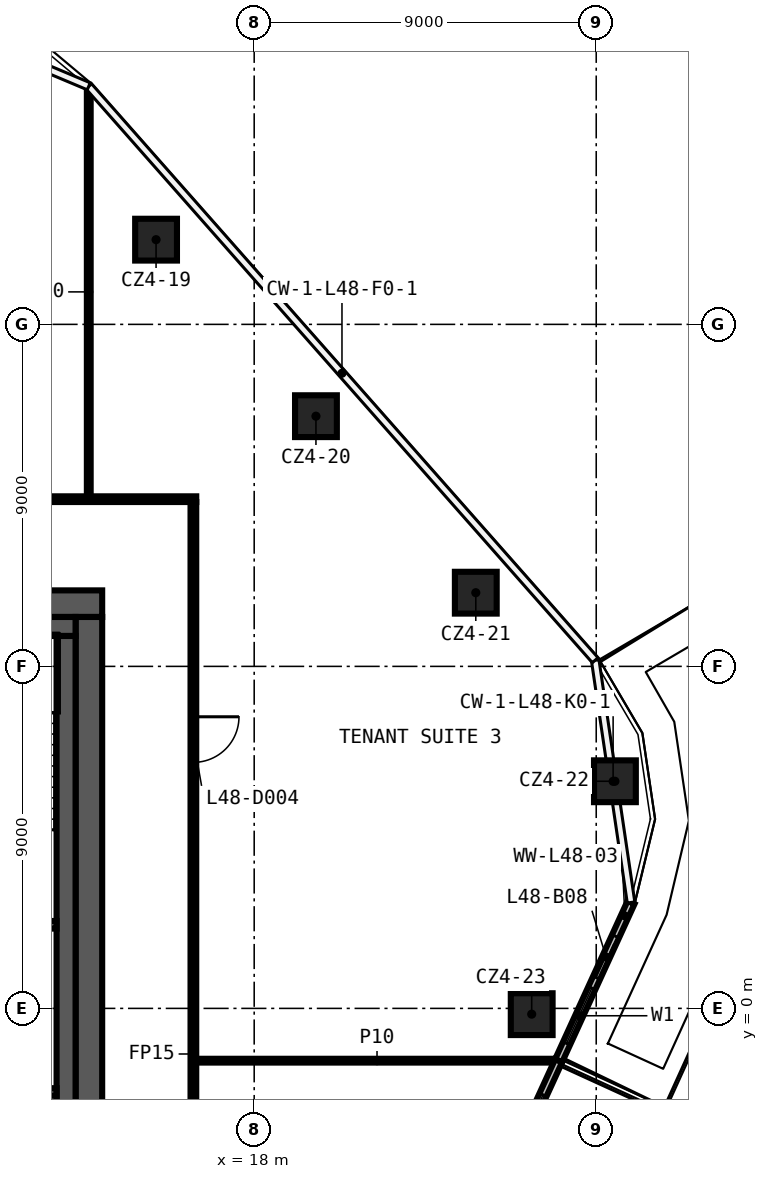
"""IFC4 building model, lengths in metres.
Left out: names, types, materials, properties, quantities, classifications, styles, units other than length and angle.
Written with IfcOpenShell. Run it as: python <this file> out.ifc"""

import sys

from ifc_helpers import new_model, si_unit, direction, frame, frame_2d, origin, origin_2d, place, context, subcontext, project, spatial, rectangle, extrude, element, fill, save


model = new_model("IFC4")
c1 = context("Model", 3, precision=1e-05, world=origin(), true_north=direction((0.0, 1.0)))
c2 = subcontext(c1, "Body", "Model", "MODEL_VIEW")
j1 = project(units=[si_unit("LENGTHUNIT", "METRE"), si_unit("PLANEANGLEUNIT", "RADIAN")], contexts=[c1])
p1 = place(None, origin())
s1 = spatial("IfcSite", under=j1, at=p1, CompositionType="ELEMENT")
p2 = place(p1, origin())
s2 = spatial("IfcBuilding", under=s1, at=p2, CompositionType="ELEMENT")
p3 = place(p2, frame((0.0, 0.0, 232.8)))
s3 = spatial("IfcBuildingStorey", under=s2, at=p3, CompositionType="ELEMENT", Elevation=232.8)
for number, where, z_axis, x_axis in (
    (1, (15.418, 20.229, 0.0), (0.0, 0.0, 1.0), (1.0, 0.0, 0.0)),
    (2, (19.625, 15.584, 0.0), (0.0, 0.0, 1.0), (1.0, 0.0, 0.0)),
    (3, (23.831, 10.939, 0.0), (0.0, 0.0, 1.0), (1.0, 0.0, 0.0)),
    (4, (27.492, 5.977, 0.0), (0.0, 0.0, 1.0), (1.0, 0.0, 0.0)),
    (5, (25.302, -0.152, 0.0), (0.0, 0.0, 1.0), (1.0, 0.0, 0.0)),
):
    element("IfcColumn", number, at=place(p3, frame(where, z_axis=z_axis, x_axis=x_axis)), inside=s3, PredefinedType="COLUMN", context=c2, shape_type="SweptSolid", body=[
        extrude(rectangle(XDim=1.1, YDim=1.1, at=origin_2d()), origin(), (0.0, 0.0, 1.0), 3.75),
    ])
p4 = place(p3, frame((16.475, -1.376, 0.0), z_axis=(0.0, 0.0, 1.0), x_axis=(1.0, 0.0, 0.0)))
e6 = element("IfcWall", 6, at=p4, inside=s3, PredefinedType="PARTITIONING", context=c2, shape_type="SweptSolid", body=[
    extrude(rectangle(XDim=9.514, YDim=0.1, at=frame_2d((4.757, 0.0))), origin(), (0.0, 0.0, 1.0), 3.75),
])
p5 = place(p3, frame((-2.075, 13.4, 0.0), z_axis=(0.0, 0.0, 1.0), x_axis=(1.0, 0.0, 0.0)))
e7 = element("IfcWall", 7, at=p5, inside=s3, PredefinedType="PARTITIONING", context=c2, shape_type="SweptSolid", body=[
    extrude(rectangle(XDim=18.55, YDim=0.15, at=frame_2d((9.275, 0.0))), origin(), (0.0, 0.0, 1.0), 3.75),
])
p6 = place(p5, frame((2.91, 0.0, 0.0)))
e8 = element("IfcOpeningElement", 8, at=p6, cuts=e7, PredefinedType="OPENING", context=c2, shape_type="SweptSolid", body=[
    extrude(rectangle(XDim=1.2, YDim=2.1, at=frame_2d((0.6, 1.05))), frame((0.0, 0.085, 0.0), z_axis=(0.0, -1.0, 0.0), x_axis=(1.0, 0.0, 0.0)), (0.0, 0.0, 1.0), 0.17),
])
p7 = place(p5, frame((7.894, 0.0, 0.0)))
e9 = element("IfcOpeningElement", 9, at=p7, cuts=e7, PredefinedType="OPENING", context=c2, shape_type="SweptSolid", body=[
    extrude(rectangle(XDim=1.2, YDim=2.1, at=frame_2d((0.6, 1.05))), frame((0.0, 0.085, 0.0), z_axis=(0.0, -1.0, 0.0), x_axis=(1.0, 0.0, 0.0)), (0.0, 0.0, 1.0), 0.17),
])
p8 = place(p3, frame((16.4, 13.325, 0.0), z_axis=(0.0, 0.0, 1.0), x_axis=(0.0, -1.0, 0.0)))
e10 = element("IfcWall", 10, at=p8, inside=s3, PredefinedType="PARTITIONING", context=c2, shape_type="SweptSolid", body=[
    extrude(rectangle(XDim=26.65, YDim=0.15, at=frame_2d((13.325, 0.0))), origin(), (0.0, 0.0, 1.0), 3.75),
])
p9 = place(p8, frame((22.199, 0.0, 0.0)))
e11 = element("IfcOpeningElement", 11, at=p9, cuts=e10, PredefinedType="OPENING", context=c2, shape_type="SweptSolid", body=[
    extrude(rectangle(XDim=1.2, YDim=2.1, at=frame_2d((0.6, 1.05))), frame((0.0, 0.085, 0.0), z_axis=(0.0, -1.0, 0.0), x_axis=(1.0, 0.0, 0.0)), (0.0, 0.0, 1.0), 0.17),
])
p10 = place(p8, frame((5.651, 0.0, 0.0)))
e12 = element("IfcOpeningElement", 12, at=p10, cuts=e10, PredefinedType="OPENING", context=c2, shape_type="SweptSolid", body=[
    extrude(rectangle(XDim=1.2, YDim=2.1, at=frame_2d((0.6, 1.05))), frame((0.0, 0.085, 0.0), z_axis=(0.0, -1.0, 0.0), x_axis=(1.0, 0.0, 0.0)), (0.0, 0.0, 1.0), 0.17),
])
p11 = place(p3, frame((13.647, 13.475, 0.0), z_axis=(0.0, 0.0, 1.0), x_axis=(0.0, 1.0, 0.0)))
e13 = element("IfcWall", 13, at=p11, inside=s3, PredefinedType="PARTITIONING", context=c2, shape_type="SweptSolid", body=[
    extrude(rectangle(XDim=10.76, YDim=0.1, at=frame_2d((5.38, 0.0))), origin(), (0.0, 0.0, 1.0), 3.75),
])
p12 = place(p3, frame((20.283, -13.892, 0.0), z_axis=(0.0, 0.0, 1.0), x_axis=(0.416106802435, 0.909315747674, 0.0)))
e14 = element("IfcWall", 14, at=p12, inside=s3, PredefinedType="SOLIDWALL", context=c2, shape_type="SweptSolid", body=[
    extrude(rectangle(XDim=13.765, YDim=0.2, at=frame_2d((6.882, 0.0))), origin(), (0.0, 0.0, 1.0), 3.75),
])
p13 = place(p12, frame((0.5, 0.0, 0.6)))
e15 = element("IfcOpeningElement", 15, at=p13, cuts=e14, PredefinedType="OPENING", context=c2, shape_type="SweptSolid", body=[
    extrude(rectangle(XDim=1.6, YDim=2.4, at=frame_2d((0.8, 1.2))), frame((0.0, 0.11, 0.0), z_axis=(0.0, -1.0, 0.0), x_axis=(1.0, 0.0, 0.0)), (0.0, 0.0, 1.0), 0.22),
])
p14 = place(p12, frame((2.4, 0.0, 0.0)))
e16 = element("IfcOpeningElement", 16, at=p14, cuts=e14, PredefinedType="OPENING", context=c2, shape_type="SweptSolid", body=[
    extrude(rectangle(XDim=1.2, YDim=2.4, at=frame_2d((0.6, 1.2))), frame((0.0, 0.11, 0.0), z_axis=(0.0, -1.0, 0.0), x_axis=(1.0, 0.0, 0.0)), (0.0, 0.0, 1.0), 0.22),
])
p15 = place(p12, frame((6.588, 0.0, 0.6)))
e17 = element("IfcOpeningElement", 17, at=p15, cuts=e14, PredefinedType="OPENING", context=c2, shape_type="SweptSolid", body=[
    extrude(rectangle(XDim=1.6, YDim=2.4, at=frame_2d((0.8, 1.2))), frame((0.0, 0.11, 0.0), z_axis=(0.0, -1.0, 0.0), x_axis=(1.0, 0.0, 0.0)), (0.0, 0.0, 1.0), 0.22),
])
p16 = place(p12, frame((5.088, 0.0, 0.0)))
e18 = element("IfcOpeningElement", 18, at=p16, cuts=e14, PredefinedType="OPENING", context=c2, shape_type="SweptSolid", body=[
    extrude(rectangle(XDim=1.2, YDim=2.4, at=frame_2d((0.6, 1.2))), frame((0.0, 0.11, 0.0), z_axis=(0.0, -1.0, 0.0), x_axis=(1.0, 0.0, 0.0)), (0.0, 0.0, 1.0), 0.22),
])
p17 = place(p12, frame((11.176, 0.0, 0.6)))
e19 = element("IfcOpeningElement", 19, at=p17, cuts=e14, PredefinedType="OPENING", context=c2, shape_type="SweptSolid", body=[
    extrude(rectangle(XDim=1.6, YDim=2.4, at=frame_2d((0.8, 1.2))), frame((0.0, 0.11, 0.0), z_axis=(0.0, -1.0, 0.0), x_axis=(1.0, 0.0, 0.0)), (0.0, 0.0, 1.0), 0.22),
])
p18 = place(p12, frame((9.676, 0.0, 0.0)))
e20 = element("IfcOpeningElement", 20, at=p18, cuts=e14, PredefinedType="OPENING", context=c2, shape_type="SweptSolid", body=[
    extrude(rectangle(XDim=1.2, YDim=2.4, at=frame_2d((0.6, 1.2))), frame((0.0, 0.11, 0.0), z_axis=(0.0, -1.0, 0.0), x_axis=(1.0, 0.0, 0.0)), (0.0, 0.0, 1.0), 0.22),
])
p19 = place(p3, frame((26.011, -1.376, 0.0), z_axis=(0.0, 0.0, 1.0), x_axis=(0.416127690122, 0.909306189088, 0.0)))
e21 = element("IfcWall", 21, at=p19, inside=s3, PredefinedType="SOLIDWALL", context=c2, shape_type="SweptSolid", body=[
    extrude(rectangle(XDim=4.579, YDim=0.2, at=frame_2d((2.289, 0.0))), origin(), (0.0, 0.0, 1.0), 3.75),
])
p20 = place(p19, frame((0.5, 0.0, 0.6)))
e22 = element("IfcOpeningElement", 22, at=p20, cuts=e21, PredefinedType="OPENING", context=c2, shape_type="SweptSolid", body=[
    extrude(rectangle(XDim=1.6, YDim=2.4, at=frame_2d((0.8, 1.2))), frame((0.0, 0.11, 0.0), z_axis=(0.0, -1.0, 0.0), x_axis=(1.0, 0.0, 0.0)), (0.0, 0.0, 1.0), 0.22),
])
p21 = place(p19, frame((2.4, 0.0, 0.0)))
e23 = element("IfcOpeningElement", 23, at=p21, cuts=e21, PredefinedType="OPENING", context=c2, shape_type="SweptSolid", body=[
    extrude(rectangle(XDim=1.2, YDim=2.4, at=frame_2d((0.6, 1.2))), frame((0.0, 0.11, 0.0), z_axis=(0.0, -1.0, 0.0), x_axis=(1.0, 0.0, 0.0)), (0.0, 0.0, 1.0), 0.22),
])
p22 = place(p3, frame((-14.0, 10.65, 0.0), z_axis=(0.0, 0.0, 1.0), x_axis=(1.0, 0.0, 0.0)))
e24 = element("IfcWall", 24, at=p22, inside=s3, PredefinedType="SHEAR", context=c2, shape_type="SweptSolid", body=[
    extrude(rectangle(XDim=28.0, YDim=0.7, at=frame_2d((14.0, 0.0))), origin(), (0.0, 0.0, 1.0), 3.75),
])
p23 = place(p22, frame((15.9, 0.0, 0.0)))
e25 = element("IfcOpeningElement", 25, at=p23, cuts=e24, PredefinedType="OPENING", context=c2, shape_type="SweptSolid", body=[
    extrude(rectangle(XDim=1.6, YDim=2.1, at=frame_2d((0.8, 1.05))), frame((0.0, 0.36, 0.0), z_axis=(0.0, -1.0, 0.0), x_axis=(1.0, 0.0, 0.0)), (0.0, 0.0, 1.0), 0.72),
])
p24 = place(p3, frame((13.65, 10.3, 0.0), z_axis=(0.0, 0.0, 1.0), x_axis=(0.0, -1.0, 0.0)))
e26 = element("IfcWall", 26, at=p24, inside=s3, PredefinedType="SHEAR", context=c2, shape_type="SweptSolid", body=[
    extrude(rectangle(XDim=20.6, YDim=0.7, at=frame_2d((10.3, 0.0))), origin(), (0.0, 0.0, 1.0), 3.75),
])
p25 = place(p3, frame((3.9, 10.05, 0.0), z_axis=(0.0, 0.0, 1.0), x_axis=(1.0, 0.0, 0.0)))
e27 = element("IfcWall", 27, at=p25, inside=s3, PredefinedType="SHEAR", context=c2, shape_type="SweptSolid", body=[
    extrude(rectangle(XDim=9.4, YDim=0.5, at=frame_2d((4.7, 0.0))), origin(), (0.0, 0.0, 1.0), 3.75),
])
p26 = place(p3, frame((13.05, 9.8, 0.0), z_axis=(0.0, 0.0, 1.0), x_axis=(0.0, -1.0, 0.0)))
e28 = element("IfcWall", 28, at=p26, inside=s3, PredefinedType="SHEAR", context=c2, shape_type="SweptSolid", body=[
    extrude(rectangle(XDim=19.6, YDim=0.5, at=frame_2d((9.8, 0.0))), origin(), (0.0, 0.0, 1.0), 3.75),
])
for number, where, z_axis, x_axis in (
    (29, (9.45, 2.2, 0.0), (0.0, 0.0, 1.0), (1.0, 0.0, 0.0)),
    (30, (9.45, -2.2, 0.0), (0.0, 0.0, 1.0), (1.0, 0.0, 0.0)),
):
    element("IfcWall", number, at=place(p3, frame(where, z_axis=z_axis, x_axis=x_axis)), inside=s3, PredefinedType="SHEAR", context=c2, shape_type="SweptSolid", body=[
        extrude(rectangle(XDim=3.35, YDim=0.2, at=frame_2d((1.675, 0.0))), origin(), (0.0, 0.0, 1.0), 3.75),
    ])
p27 = place(p10, origin())
e31 = element("IfcDoor", 31, at=p27, inside=s3, OperationType="SINGLE_SWING_LEFT", PredefinedType="DOOR", context=c2, shape_type="SweptSolid", body=[
    extrude(rectangle(XDim=1.2, YDim=2.1, at=frame_2d((0.6, 1.05))), frame((0.0, 0.025, 0.0), z_axis=(0.0, -1.0, 0.0), x_axis=(1.0, 0.0, 0.0)), (0.0, 0.0, 1.0), 0.05),
])
fill(e12, e31)
p28 = place(p17, origin())
e32 = element("IfcWindow", 32, at=p28, inside=s3, PartitioningType="SINGLE_PANEL", PredefinedType="WINDOW", context=c2, shape_type="SweptSolid", body=[
    extrude(rectangle(XDim=1.6, YDim=2.4, at=frame_2d((0.8, 1.2))), frame((0.0, 0.03, 0.0), z_axis=(0.0, -1.0, 0.0), x_axis=(1.0, 0.0, 0.0)), (0.0, 0.0, 1.0), 0.06),
])
fill(e19, e32)
p29 = place(p20, origin())
e33 = element("IfcWindow", 33, at=p29, inside=s3, PartitioningType="SINGLE_PANEL", PredefinedType="WINDOW", context=c2, shape_type="SweptSolid", body=[
    extrude(rectangle(XDim=1.6, YDim=2.4, at=frame_2d((0.8, 1.2))), frame((0.0, 0.03, 0.0), z_axis=(0.0, -1.0, 0.0), x_axis=(1.0, 0.0, 0.0)), (0.0, 0.0, 1.0), 0.06),
])
fill(e22, e33)
p30 = place(p21, origin())
e34 = element("IfcDoor", 34, at=p30, inside=s3, OperationType="SLIDING_TO_LEFT", PredefinedType="DOOR", context=c2, shape_type="SweptSolid", body=[
    extrude(rectangle(XDim=1.2, YDim=2.4, at=frame_2d((0.6, 1.2))), frame((0.0, 0.025, 0.0), z_axis=(0.0, -1.0, 0.0), x_axis=(1.0, 0.0, 0.0)), (0.0, 0.0, 1.0), 0.05),
])
fill(e23, e34)
save(model, sys.argv[1])
